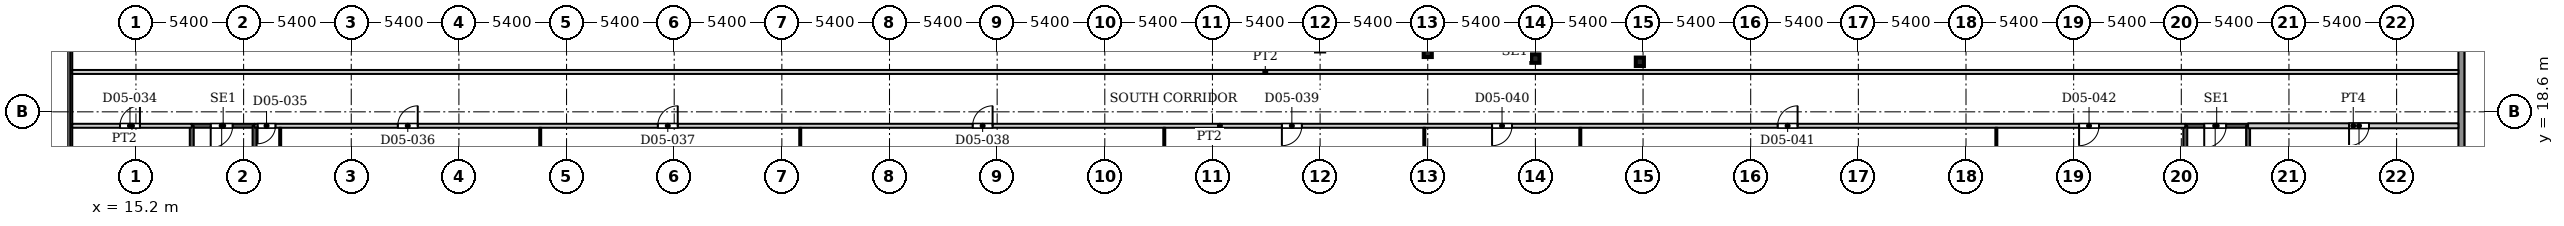
"""IFC4 building model, lengths in metres.
Left out: names, types, materials, properties, quantities, classifications, styles, units other than length and angle.
Written with IfcOpenShell. Run it as: python <this file> out.ifc"""

import sys

from ifc_helpers import new_model, si_unit, direction, frame, frame_2d, origin, origin_2d, place, context, subcontext, project, spatial, rectangle, i_section, extrude, source, transform, mapped, element, fill, save


model = new_model("IFC4")
c1 = context("Model", 3, precision=1e-05, world=origin(), true_north=direction((0.0, 1.0)))
c2 = subcontext(c1, "Body", "Model", "MODEL_VIEW")
j1 = project(units=[si_unit("LENGTHUNIT", "METRE"), si_unit("PLANEANGLEUNIT", "RADIAN")], contexts=[c1])
p1 = place(None, origin())
s1 = spatial("IfcSite", under=j1, at=p1, CompositionType="ELEMENT")
p2 = place(p1, origin())
s2 = spatial("IfcBuilding", under=s1, at=p2, CompositionType="ELEMENT")
p3 = place(p2, frame((0.0, 0.0, 26.0)))
s3 = spatial("IfcBuildingStorey", under=s2, at=p3, CompositionType="ELEMENT", Elevation=26.0)
for number, where, z_axis, x_axis in (
    (1, (90.64, 21.11, 0.0), (0.0, 0.0, 1.0), (1.0, 0.0, 0.0)),
    (2, (85.4, 21.27, 0.0), (0.0, 0.0, 1.0), (1.0, 0.0, 0.0)),
    (3, (80.0, 21.56, 0.0), (0.0, 0.0, 1.0), (1.0, 0.0, 0.0)),
):
    element("IfcColumn", number, at=place(p3, frame(where, z_axis=z_axis, x_axis=x_axis)), inside=s3, PredefinedType="COLUMN", context=c2, shape_type="SweptSolid", body=[
        extrude(i_section(OverallWidth=0.409, OverallDepth=0.425, WebThickness=0.033, FlangeThickness=0.052, FilletRadius=0.013, at=origin_2d()), origin(), (0.0, 0.0, 1.0), 4.5),
    ])
p4 = place(p3, frame((131.85, 54.72, 0.0), z_axis=(0.0, 0.0, 1.0), x_axis=(0.0, -1.0, 0.0)))
e4 = element("IfcWall", 4, at=p4, inside=s3, PredefinedType="SOLIDWALL", context=c2, shape_type="SweptSolid", body=[
    extrude(rectangle(XDim=38.72, YDim=0.3, at=frame_2d((19.36, 0.0))), origin(), (0.0, 0.0, 1.0), 4.25),
])
p5 = place(p4, frame((2.435, 0.0, 2.4)))
e5 = element("IfcOpeningElement", 5, at=p5, cuts=e4, PredefinedType="OPENING", context=c2, shape_type="SweptSolid", body=[
    extrude(rectangle(XDim=2.7, YDim=1.2, at=frame_2d((1.35, 0.6))), frame((0.0, 0.16, 0.0), z_axis=(0.0, -1.0, 0.0), x_axis=(1.0, 0.0, 0.0)), (0.0, 0.0, 1.0), 0.32),
])
p6 = place(p4, frame((13.58, 0.0, 2.4)))
e6 = element("IfcOpeningElement", 6, at=p6, cuts=e4, PredefinedType="OPENING", context=c2, shape_type="SweptSolid", body=[
    extrude(rectangle(XDim=2.7, YDim=1.2, at=frame_2d((1.35, 0.6))), frame((0.0, 0.16, 0.0), z_axis=(0.0, -1.0, 0.0), x_axis=(1.0, 0.0, 0.0)), (0.0, 0.0, 1.0), 0.32),
])
p7 = place(p4, frame((26.16, 0.0, 2.4)))
e7 = element("IfcOpeningElement", 7, at=p7, cuts=e4, PredefinedType="OPENING", context=c2, shape_type="SweptSolid", body=[
    extrude(rectangle(XDim=2.7, YDim=1.2, at=frame_2d((1.35, 0.6))), frame((0.0, 0.16, 0.0), z_axis=(0.0, -1.0, 0.0), x_axis=(1.0, 0.0, 0.0)), (0.0, 0.0, 1.0), 0.32),
])
p8 = place(p3, frame((18.0, 17.9, 0.0), z_axis=(0.0, 0.0, 1.0), x_axis=(1.0, 0.0, 0.0)))
e8 = element("IfcWall", 8, at=p8, inside=s3, PredefinedType="SHEAR", context=c2, shape_type="SweptSolid", body=[
    extrude(rectangle(XDim=3.15, YDim=0.2, at=frame_2d((1.575, 0.0))), origin(), (0.0, 0.0, 1.0), 4.5),
])
p9 = place(p8, frame((0.95, 0.0, 0.0)))
e9 = element("IfcOpeningElement", 9, at=p9, cuts=e8, PredefinedType="OPENING", context=c2, shape_type="SweptSolid", body=[
    extrude(rectangle(XDim=1.1, YDim=2.2, at=frame_2d((0.55, 1.1))), frame((0.0, 0.11, 0.0), z_axis=(0.0, -1.0, 0.0), x_axis=(1.0, 0.0, 0.0)), (0.0, 0.0, 1.0), 0.22),
])
p10 = place(p3, frame((18.0, 11.2, 0.0), z_axis=(0.0, 0.0, 1.0), x_axis=(0.0, 1.0, 0.0)))
e10 = element("IfcWall", 10, at=p10, inside=s3, PredefinedType="SHEAR", context=c2, shape_type="SweptSolid", body=[
    extrude(rectangle(XDim=6.7, YDim=0.2, at=frame_2d((3.35, 0.0))), origin(), (0.0, 0.0, 1.0), 4.5),
])
p11 = place(p3, frame((21.15, 10.0, 0.0), z_axis=(0.0, 0.0, 1.0), x_axis=(0.0, 1.0, 0.0)))
e11 = element("IfcWall", 11, at=p11, inside=s3, PredefinedType="SHEAR", context=c2, shape_type="SweptSolid", body=[
    extrude(rectangle(XDim=7.9, YDim=0.2, at=frame_2d((3.95, 0.0))), origin(), (0.0, 0.0, 1.0), 4.5),
])
p12 = place(p3, frame((118.0, 17.9, 0.0), z_axis=(0.0, 0.0, 1.0), x_axis=(1.0, 0.0, 0.0)))
e12 = element("IfcWall", 12, at=p12, inside=s3, PredefinedType="SHEAR", context=c2, shape_type="SweptSolid", body=[
    extrude(rectangle(XDim=3.15, YDim=0.2, at=frame_2d((1.575, 0.0))), origin(), (0.0, 0.0, 1.0), 4.5),
])
p13 = place(p12, frame((0.95, 0.0, 0.0)))
e13 = element("IfcOpeningElement", 13, at=p13, cuts=e12, PredefinedType="OPENING", context=c2, shape_type="SweptSolid", body=[
    extrude(rectangle(XDim=1.1, YDim=2.2, at=frame_2d((0.55, 1.1))), frame((0.0, 0.11, 0.0), z_axis=(0.0, -1.0, 0.0), x_axis=(1.0, 0.0, 0.0)), (0.0, 0.0, 1.0), 0.22),
])
p14 = place(p3, frame((118.0, 11.2, 0.0), z_axis=(0.0, 0.0, 1.0), x_axis=(0.0, 1.0, 0.0)))
e14 = element("IfcWall", 14, at=p14, inside=s3, PredefinedType="SHEAR", context=c2, shape_type="SweptSolid", body=[
    extrude(rectangle(XDim=6.7, YDim=0.2, at=frame_2d((3.35, 0.0))), origin(), (0.0, 0.0, 1.0), 4.5),
])
p15 = place(p3, frame((121.15, 10.0, 0.0), z_axis=(0.0, 0.0, 1.0), x_axis=(0.0, 1.0, 0.0)))
e15 = element("IfcWall", 15, at=p15, inside=s3, PredefinedType="SHEAR", context=c2, shape_type="SweptSolid", body=[
    extrude(rectangle(XDim=7.9, YDim=0.2, at=frame_2d((3.95, 0.0))), origin(), (0.0, 0.0, 1.0), 4.5),
])
p16 = place(p3, frame((12.0, 17.9, 0.0), z_axis=(0.0, 0.0, 1.0), x_axis=(1.0, 0.0, 0.0)))
e16 = element("IfcWall", 16, at=p16, inside=s3, PredefinedType="PARTITIONING", context=c2, shape_type="SweptSolid", body=[
    extrude(rectangle(XDim=6.0, YDim=0.2, at=frame_2d((3.0, 0.0))), origin(), (0.0, 0.0, 1.0), 4.2),
])
p17 = place(p16, frame((2.4, 0.0, 0.0)))
e17 = element("IfcOpeningElement", 17, at=p17, cuts=e16, PredefinedType="OPENING", context=c2, shape_type="SweptSolid", body=[
    extrude(rectangle(XDim=1.0, YDim=2.1, at=frame_2d((0.5, 1.05))), frame((0.0, 0.11, 0.0), z_axis=(0.0, -1.0, 0.0), x_axis=(1.0, 0.0, 0.0)), (0.0, 0.0, 1.0), 0.22),
])
p18 = place(p3, frame((12.0, 20.6, 0.0), z_axis=(0.0, 0.0, 1.0), x_axis=(1.0, 0.0, 0.0)))
e18 = element("IfcWall", 18, at=p18, inside=s3, PredefinedType="PARTITIONING", context=c2, shape_type="SweptSolid", body=[
    extrude(rectangle(XDim=119.701, YDim=0.2, at=frame_2d((59.851, 0.0))), origin(), (0.0, 0.0, 1.0), 4.2),
])
p19 = place(p3, frame((21.15, 17.9, 0.0), z_axis=(0.0, 0.0, 1.0), x_axis=(1.0, 0.0, 0.0)))
e19 = element("IfcWall", 19, at=p19, inside=s3, PredefinedType="PARTITIONING", context=c2, shape_type="SweptSolid", body=[
    extrude(rectangle(XDim=96.85, YDim=0.2, at=frame_2d((48.425, 0.0))), origin(), (0.0, 0.0, 1.0), 4.2),
])
p20 = place(p19, frame((0.15, 0.0, 0.0)))
e20 = element("IfcOpeningElement", 20, at=p20, cuts=e19, PredefinedType="OPENING", context=c2, shape_type="SweptSolid", body=[
    extrude(rectangle(XDim=0.9, YDim=2.1, at=frame_2d((0.45, 1.05))), frame((0.0, 0.11, 0.0), z_axis=(0.0, -1.0, 0.0), x_axis=(1.0, 0.0, 0.0)), (0.0, 0.0, 1.0), 0.22),
])
p21 = place(p19, frame((7.185, 0.0, 0.0)))
e21 = element("IfcOpeningElement", 21, at=p21, cuts=e19, PredefinedType="OPENING", context=c2, shape_type="SweptSolid", body=[
    extrude(rectangle(XDim=1.0, YDim=2.1, at=frame_2d((0.5, 1.05))), frame((0.0, 0.11, 0.0), z_axis=(0.0, -1.0, 0.0), x_axis=(1.0, 0.0, 0.0)), (0.0, 0.0, 1.0), 0.22),
])
p22 = place(p19, frame((20.228, 0.0, 0.0)))
e22 = element("IfcOpeningElement", 22, at=p22, cuts=e19, PredefinedType="OPENING", context=c2, shape_type="SweptSolid", body=[
    extrude(rectangle(XDim=1.0, YDim=2.1, at=frame_2d((0.5, 1.05))), frame((0.0, 0.11, 0.0), z_axis=(0.0, -1.0, 0.0), x_axis=(1.0, 0.0, 0.0)), (0.0, 0.0, 1.0), 0.22),
])
p23 = place(p19, frame((36.022, 0.0, 0.0)))
e23 = element("IfcOpeningElement", 23, at=p23, cuts=e19, PredefinedType="OPENING", context=c2, shape_type="SweptSolid", body=[
    extrude(rectangle(XDim=1.0, YDim=2.1, at=frame_2d((0.5, 1.05))), frame((0.0, 0.11, 0.0), z_axis=(0.0, -1.0, 0.0), x_axis=(1.0, 0.0, 0.0)), (0.0, 0.0, 1.0), 0.22),
])
p24 = place(p19, frame((51.533, 0.0, 0.0)))
e24 = element("IfcOpeningElement", 24, at=p24, cuts=e19, PredefinedType="OPENING", context=c2, shape_type="SweptSolid", body=[
    extrude(rectangle(XDim=1.0, YDim=2.1, at=frame_2d((0.5, 1.05))), frame((0.0, 0.11, 0.0), z_axis=(0.0, -1.0, 0.0), x_axis=(1.0, 0.0, 0.0)), (0.0, 0.0, 1.0), 0.22),
])
p25 = place(p19, frame((62.076, 0.0, 0.0)))
e25 = element("IfcOpeningElement", 25, at=p25, cuts=e19, PredefinedType="OPENING", context=c2, shape_type="SweptSolid", body=[
    extrude(rectangle(XDim=1.0, YDim=2.1, at=frame_2d((0.5, 1.05))), frame((0.0, 0.11, 0.0), z_axis=(0.0, -1.0, 0.0), x_axis=(1.0, 0.0, 0.0)), (0.0, 0.0, 1.0), 0.22),
])
p26 = place(p19, frame((76.402, 0.0, 0.0)))
e26 = element("IfcOpeningElement", 26, at=p26, cuts=e19, PredefinedType="OPENING", context=c2, shape_type="SweptSolid", body=[
    extrude(rectangle(XDim=1.0, YDim=2.1, at=frame_2d((0.5, 1.05))), frame((0.0, 0.11, 0.0), z_axis=(0.0, -1.0, 0.0), x_axis=(1.0, 0.0, 0.0)), (0.0, 0.0, 1.0), 0.22),
])
p27 = place(p19, frame((91.522, 0.0, 0.0)))
e27 = element("IfcOpeningElement", 27, at=p27, cuts=e19, PredefinedType="OPENING", context=c2, shape_type="SweptSolid", body=[
    extrude(rectangle(XDim=1.0, YDim=2.1, at=frame_2d((0.5, 1.05))), frame((0.0, 0.11, 0.0), z_axis=(0.0, -1.0, 0.0), x_axis=(1.0, 0.0, 0.0)), (0.0, 0.0, 1.0), 0.22),
])
for number, where, z_axis, x_axis in (
    (28, (22.435, 10.299, 0.0), (0.0, 0.0, 1.0), (0.0, 1.0, 0.0)),
    (29, (35.478, 10.299, 0.0), (0.0, 0.0, 1.0), (0.0, 1.0, 0.0)),
    (30, (48.522, 10.299, 0.0), (0.0, 0.0, 1.0), (0.0, 1.0, 0.0)),
):
    element("IfcWall", number, at=place(p3, frame(where, z_axis=z_axis, x_axis=x_axis)), inside=s3, PredefinedType="PARTITIONING", context=c2, shape_type="SweptSolid", body=[
        extrude(rectangle(XDim=7.501, YDim=0.1, at=frame_2d((3.75, 0.0))), origin(), (0.0, 0.0, 1.0), 4.2),
    ])
for number, where, z_axis, x_axis in (
    (31, (66.783, 10.0, 0.0), (0.0, 0.0, 1.0), (0.0, 1.0, 0.0)),
    (32, (79.826, 10.0, 0.0), (0.0, 0.0, 1.0), (0.0, 1.0, 0.0)),
    (33, (87.652, 10.0, 0.0), (0.0, 0.0, 1.0), (0.0, 1.0, 0.0)),
    (34, (108.522, 10.0, 0.0), (0.0, 0.0, 1.0), (0.0, 1.0, 0.0)),
):
    element("IfcWall", number, at=place(p3, frame(where, z_axis=z_axis, x_axis=x_axis)), inside=s3, PredefinedType="PARTITIONING", context=c2, shape_type="SweptSolid", body=[
        extrude(rectangle(XDim=7.8, YDim=0.1, at=frame_2d((3.9, 0.0))), origin(), (0.0, 0.0, 1.0), 4.2),
    ])
p28 = place(p3, frame((121.15, 17.9, 0.0), z_axis=(0.0, 0.0, 1.0), x_axis=(1.0, 0.0, 0.0)))
e35 = element("IfcWall", 35, at=p28, inside=s3, PredefinedType="PARTITIONING", context=c2, shape_type="SweptSolid", body=[
    extrude(rectangle(XDim=10.551, YDim=0.25, at=frame_2d((5.275, 0.0))), origin(), (0.0, 0.0, 1.0), 4.2),
])
p29 = place(p28, frame((5.065, 0.0, 0.0)))
e36 = element("IfcOpeningElement", 36, at=p29, cuts=e35, PredefinedType="OPENING", context=c2, shape_type="SweptSolid", body=[
    extrude(rectangle(XDim=1.0, YDim=2.1, at=frame_2d((0.5, 1.05))), frame((0.0, 0.135, 0.0), z_axis=(0.0, -1.0, 0.0), x_axis=(1.0, 0.0, 0.0)), (0.0, 0.0, 1.0), 0.27),
])
m1 = source(origin(), c2, "Body", "SweptSolid", [
    extrude(rectangle(XDim=1.1, YDim=2.2, at=frame_2d((0.55, 1.1))), frame((0.0, 0.025, 0.0), z_axis=(0.0, -1.0, 0.0), x_axis=(1.0, 0.0, 0.0)), (0.0, 0.0, 1.0), 0.05),
])
p30 = place(p9, origin())
e37 = element("IfcDoor", 37, at=p30, inside=s3, OperationType="SINGLE_SWING_RIGHT", PredefinedType="DOOR", context=c2, shape_type="MappedRepresentation", body=[
    mapped(m1, transform((0.0, 0.0, 0.0), x_axis=(1.0, 0.0, 0.0), y_axis=(0.0, 1.0, 0.0), z_axis=(0.0, 0.0, 1.0), scale=1.0)),
])
fill(e9, e37)
p31 = place(p13, origin())
e38 = element("IfcDoor", 38, at=p31, inside=s3, OperationType="SINGLE_SWING_RIGHT", PredefinedType="DOOR", context=c2, shape_type="MappedRepresentation", body=[
    mapped(m1, transform((0.0, 0.0, 0.0), x_axis=(1.0, 0.0, 0.0), y_axis=(0.0, 1.0, 0.0), z_axis=(0.0, 0.0, 1.0), scale=1.0)),
])
fill(e13, e38)
m2 = source(origin(), c2, "Body", "SweptSolid", [
    extrude(rectangle(XDim=1.0, YDim=2.1, at=frame_2d((0.5, 1.05))), frame((0.0, 0.025, 0.0), z_axis=(0.0, -1.0, 0.0), x_axis=(1.0, 0.0, 0.0)), (0.0, 0.0, 1.0), 0.05),
])
p32 = place(p17, origin())
e39 = element("IfcDoor", 39, at=p32, inside=s3, OperationType="SINGLE_SWING_LEFT", PredefinedType="DOOR", context=c2, shape_type="MappedRepresentation", body=[
    mapped(m2, transform((0.0, 0.0, 0.0), x_axis=(1.0, 0.0, 0.0), y_axis=(0.0, 1.0, 0.0), z_axis=(0.0, 0.0, 1.0), scale=1.0)),
])
fill(e17, e39)
m3 = source(origin(), c2, "Body", "SweptSolid", [
    extrude(rectangle(XDim=0.9, YDim=2.1, at=frame_2d((0.45, 1.05))), frame((0.0, 0.025, 0.0), z_axis=(0.0, -1.0, 0.0), x_axis=(1.0, 0.0, 0.0)), (0.0, 0.0, 1.0), 0.05),
])
p33 = place(p20, origin())
e40 = element("IfcDoor", 40, at=p33, inside=s3, OperationType="SINGLE_SWING_RIGHT", PredefinedType="DOOR", context=c2, shape_type="MappedRepresentation", body=[
    mapped(m3, transform((0.0, 0.0, 0.0), x_axis=(1.0, 0.0, 0.0), y_axis=(0.0, 1.0, 0.0), z_axis=(0.0, 0.0, 1.0), scale=1.0)),
])
fill(e20, e40)
p34 = place(p21, origin())
e41 = element("IfcDoor", 41, at=p34, inside=s3, OperationType="SINGLE_SWING_LEFT", PredefinedType="DOOR", context=c2, shape_type="MappedRepresentation", body=[
    mapped(m2, transform((0.0, 0.0, 0.0), x_axis=(1.0, 0.0, 0.0), y_axis=(0.0, 1.0, 0.0), z_axis=(0.0, 0.0, 1.0), scale=1.0)),
])
fill(e21, e41)
p35 = place(p22, origin())
e42 = element("IfcDoor", 42, at=p35, inside=s3, OperationType="SINGLE_SWING_LEFT", PredefinedType="DOOR", context=c2, shape_type="MappedRepresentation", body=[
    mapped(m2, transform((0.0, 0.0, 0.0), x_axis=(1.0, 0.0, 0.0), y_axis=(0.0, 1.0, 0.0), z_axis=(0.0, 0.0, 1.0), scale=1.0)),
])
fill(e22, e42)
p36 = place(p23, origin())
e43 = element("IfcDoor", 43, at=p36, inside=s3, OperationType="SINGLE_SWING_LEFT", PredefinedType="DOOR", context=c2, shape_type="MappedRepresentation", body=[
    mapped(m2, transform((0.0, 0.0, 0.0), x_axis=(1.0, 0.0, 0.0), y_axis=(0.0, 1.0, 0.0), z_axis=(0.0, 0.0, 1.0), scale=1.0)),
])
fill(e23, e43)
p37 = place(p24, origin())
e44 = element("IfcDoor", 44, at=p37, inside=s3, OperationType="SINGLE_SWING_RIGHT", PredefinedType="DOOR", context=c2, shape_type="MappedRepresentation", body=[
    mapped(m2, transform((0.0, 0.0, 0.0), x_axis=(1.0, 0.0, 0.0), y_axis=(0.0, 1.0, 0.0), z_axis=(0.0, 0.0, 1.0), scale=1.0)),
])
fill(e24, e44)
p38 = place(p25, origin())
e45 = element("IfcDoor", 45, at=p38, inside=s3, OperationType="SINGLE_SWING_RIGHT", PredefinedType="DOOR", context=c2, shape_type="MappedRepresentation", body=[
    mapped(m2, transform((0.0, 0.0, 0.0), x_axis=(1.0, 0.0, 0.0), y_axis=(0.0, 1.0, 0.0), z_axis=(0.0, 0.0, 1.0), scale=1.0)),
])
fill(e25, e45)
p39 = place(p26, origin())
e46 = element("IfcDoor", 46, at=p39, inside=s3, OperationType="SINGLE_SWING_LEFT", PredefinedType="DOOR", context=c2, shape_type="MappedRepresentation", body=[
    mapped(m2, transform((0.0, 0.0, 0.0), x_axis=(1.0, 0.0, 0.0), y_axis=(0.0, 1.0, 0.0), z_axis=(0.0, 0.0, 1.0), scale=1.0)),
])
fill(e26, e46)
p40 = place(p27, origin())
e47 = element("IfcDoor", 47, at=p40, inside=s3, OperationType="SINGLE_SWING_RIGHT", PredefinedType="DOOR", context=c2, shape_type="MappedRepresentation", body=[
    mapped(m2, transform((0.0, 0.0, 0.0), x_axis=(1.0, 0.0, 0.0), y_axis=(0.0, 1.0, 0.0), z_axis=(0.0, 0.0, 1.0), scale=1.0)),
])
fill(e27, e47)
m4 = source(origin(), c2, "Body", "SweptSolid", [
    extrude(rectangle(XDim=1.0, YDim=2.1, at=frame_2d((0.5, 1.05))), frame((0.0, 0.025, 0.0), z_axis=(0.0, -1.0, 0.0), x_axis=(1.0, 0.0, 0.0)), (0.0, 0.0, 1.0), 0.05),
])
p41 = place(p29, origin())
e48 = element("IfcDoor", 48, at=p41, inside=s3, OperationType="SINGLE_SWING_RIGHT", PredefinedType="DOOR", context=c2, shape_type="MappedRepresentation", body=[
    mapped(m4, transform((0.0, 0.0, 0.0), x_axis=(1.0, 0.0, 0.0), y_axis=(0.0, 1.0, 0.0), z_axis=(0.0, 0.0, 1.0), scale=1.0)),
])
fill(e36, e48)
save(model, sys.argv[1])
